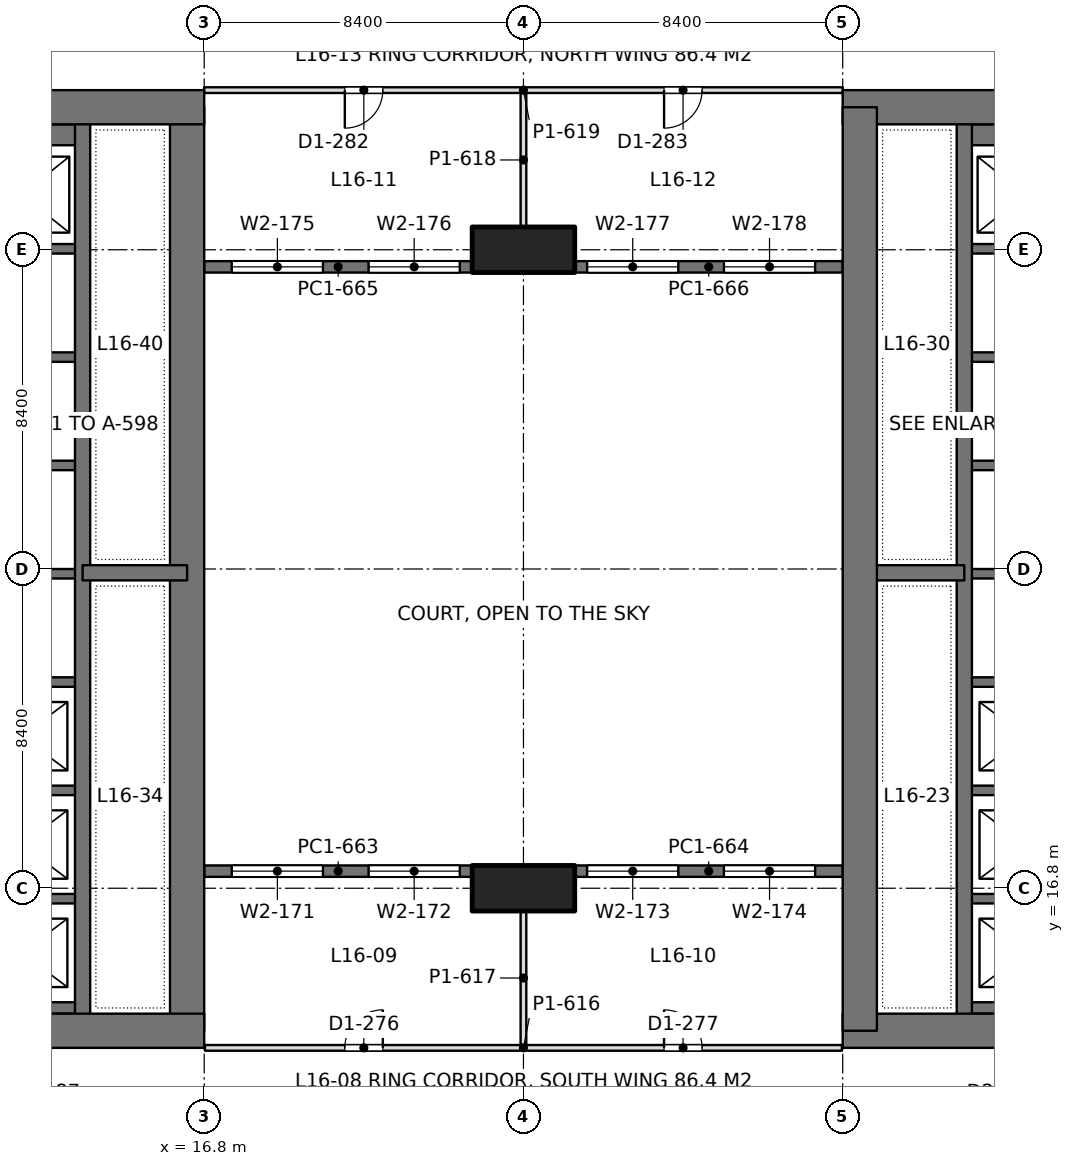
"""IFC4 building model, lengths in metres.
Left out: names, types, materials, properties, quantities, classifications, styles, units other than length and angle.
Written with IfcOpenShell. Run it as: python <this file> out.ifc"""

import sys

from ifc_helpers import new_model, si_unit, direction, frame, frame_2d, origin, origin_2d, place, context, subcontext, project, spatial, rectangle, extrude, element, fill, save


model = new_model("IFC4")
c1 = context("Model", 3, precision=1e-05, world=origin(), true_north=direction((0.0, 1.0)))
c2 = subcontext(c1, "Body", "Model", "MODEL_VIEW")
j1 = project(units=[si_unit("LENGTHUNIT", "METRE"), si_unit("PLANEANGLEUNIT", "RADIAN")], contexts=[c1])
p1 = place(None, origin())
s1 = spatial("IfcSite", under=j1, at=p1, CompositionType="ELEMENT")
p2 = place(p1, origin())
s2 = spatial("IfcBuilding", under=s1, at=p2, CompositionType="ELEMENT")
p3 = place(p2, frame((0.0, 0.0, 72.9)))
s3 = spatial("IfcBuildingStorey", under=s2, at=p3, CompositionType="ELEMENT", Elevation=72.9)
for number, where, z_axis, x_axis in (
    (1, (25.2, 16.8, 0.0), (0.0, 0.0, 1.0), (1.0, 0.0, 0.0)),
    (2, (25.2, 33.6, 0.0), (0.0, 0.0, 1.0), (1.0, 0.0, 0.0)),
):
    element("IfcColumn", number, at=place(p3, frame(where, z_axis=z_axis, x_axis=x_axis)), inside=s3, PredefinedType="COLUMN", context=c2, shape_type="SweptSolid", body=[
        extrude(rectangle(XDim=2.7, YDim=1.2, at=origin_2d()), origin(), (0.0, 0.0, 1.0), 4.5),
    ])
p4 = place(p3, frame((-1.2, 13.05, 0.0), z_axis=(0.0, 0.0, 1.0), x_axis=(1.0, 0.0, 0.0)))
e3 = element("IfcWall", 3, at=p4, inside=s3, PredefinedType="SHEAR", context=c2, shape_type="SweptSolid", body=[
    extrude(rectangle(XDim=18.0, YDim=0.9, at=frame_2d((9.0, 0.0))), origin(), (0.0, 0.0, 1.0), 4.5),
])
p5 = place(p4, frame((8.95, 0.0, 0.0)))
e4 = element("IfcOpeningElement", 4, at=p5, cuts=e3, PredefinedType="OPENING", context=c2, shape_type="SweptSolid", body=[
    extrude(rectangle(XDim=1.8, YDim=2.4, at=frame_2d((0.9, 1.2))), frame((0.0, 0.46, 0.0), z_axis=(0.0, -1.0, 0.0), x_axis=(1.0, 0.0, 0.0)), (0.0, 0.0, 1.0), 0.92),
])
p6 = place(p3, frame((-1.2, 37.35, 0.0), z_axis=(0.0, 0.0, 1.0), x_axis=(1.0, 0.0, 0.0)))
e5 = element("IfcWall", 5, at=p6, inside=s3, PredefinedType="SHEAR", context=c2, shape_type="SweptSolid", body=[
    extrude(rectangle(XDim=18.0, YDim=0.9, at=frame_2d((9.0, 0.0))), origin(), (0.0, 0.0, 1.0), 4.5),
])
p7 = place(p6, frame((8.95, 0.0, 0.0)))
e6 = element("IfcOpeningElement", 6, at=p7, cuts=e5, PredefinedType="OPENING", context=c2, shape_type="SweptSolid", body=[
    extrude(rectangle(XDim=1.8, YDim=2.4, at=frame_2d((0.9, 1.2))), frame((0.0, 0.46, 0.0), z_axis=(0.0, -1.0, 0.0), x_axis=(1.0, 0.0, 0.0)), (0.0, 0.0, 1.0), 0.92),
])
p8 = place(p3, frame((16.35, 13.05, 0.0), z_axis=(0.0, 0.0, 1.0), x_axis=(0.0, 1.0, 0.0)))
e7 = element("IfcWall", 7, at=p8, inside=s3, PredefinedType="SHEAR", context=c2, shape_type="SweptSolid", body=[
    extrude(rectangle(XDim=24.3, YDim=0.9, at=frame_2d((12.15, 0.0))), origin(), (0.0, 0.0, 1.0), 4.5),
])
p9 = place(p3, frame((13.6, 13.05, 0.0), z_axis=(0.0, 0.0, 1.0), x_axis=(0.0, 1.0, 0.0)))
e8 = element("IfcWall", 8, at=p9, inside=s3, PredefinedType="SHEAR", context=c2, shape_type="SweptSolid", body=[
    extrude(rectangle(XDim=24.3, YDim=0.4, at=frame_2d((12.15, 0.0))), origin(), (0.0, 0.0, 1.0), 4.5),
])
p10 = place(p3, frame((13.6, 25.1, 0.0), z_axis=(0.0, 0.0, 1.0), x_axis=(1.0, 0.0, 0.0)))
e9 = element("IfcWall", 9, at=p10, inside=s3, PredefinedType="SHEAR", context=c2, shape_type="SweptSolid", body=[
    extrude(rectangle(XDim=2.75, YDim=0.4, at=frame_2d((1.375, 0.0))), origin(), (0.0, 0.0, 1.0), 4.5),
])
p11 = place(p3, frame((10.4, 13.65, 0.0), z_axis=(0.0, 0.0, 1.0), x_axis=(1.0, 0.0, 0.0)))
e10 = element("IfcWall", 10, at=p11, inside=s3, PredefinedType="SHEAR", context=c2, shape_type="SweptSolid", body=[
    extrude(rectangle(XDim=3.2, YDim=0.3, at=frame_2d((1.6, 0.0))), origin(), (0.0, 0.0, 1.0), 4.5),
])
for number, where, z_axis, x_axis in (
    (11, (10.4, 16.525, 0.0), (0.0, 0.0, 1.0), (1.0, 0.0, 0.0)),
    (12, (10.4, 19.375, 0.0), (0.0, 0.0, 1.0), (1.0, 0.0, 0.0)),
    (13, (10.4, 22.225, 0.0), (0.0, 0.0, 1.0), (1.0, 0.0, 0.0)),
    (14, (10.4, 25.075, 0.0), (0.0, 0.0, 1.0), (1.0, 0.0, 0.0)),
    (15, (10.4, 27.925, 0.0), (0.0, 0.0, 1.0), (1.0, 0.0, 0.0)),
    (16, (10.4, 30.775, 0.0), (0.0, 0.0, 1.0), (1.0, 0.0, 0.0)),
    (17, (10.4, 33.625, 0.0), (0.0, 0.0, 1.0), (1.0, 0.0, 0.0)),
):
    element("IfcWall", number, at=place(p3, frame(where, z_axis=z_axis, x_axis=x_axis)), inside=s3, PredefinedType="SHEAR", context=c2, shape_type="SweptSolid", body=[
        extrude(rectangle(XDim=3.2, YDim=0.25, at=frame_2d((1.6, 0.0))), origin(), (0.0, 0.0, 1.0), 4.5),
    ])
p12 = place(p3, frame((10.4, 36.625, 0.0), z_axis=(0.0, 0.0, 1.0), x_axis=(1.0, 0.0, 0.0)))
e18 = element("IfcWall", 18, at=p12, inside=s3, PredefinedType="SHEAR", context=c2, shape_type="SweptSolid", body=[
    extrude(rectangle(XDim=3.2, YDim=0.55, at=frame_2d((1.6, 0.0))), origin(), (0.0, 0.0, 1.0), 4.5),
])
p13 = place(p3, frame((33.6, 13.05, 0.0), z_axis=(0.0, 0.0, 1.0), x_axis=(1.0, 0.0, 0.0)))
e19 = element("IfcWall", 19, at=p13, inside=s3, PredefinedType="SHEAR", context=c2, shape_type="SweptSolid", body=[
    extrude(rectangle(XDim=18.0, YDim=0.9, at=frame_2d((9.0, 0.0))), origin(), (0.0, 0.0, 1.0), 4.5),
])
p14 = place(p13, frame((7.25, 0.0, 0.0)))
e20 = element("IfcOpeningElement", 20, at=p14, cuts=e19, PredefinedType="OPENING", context=c2, shape_type="SweptSolid", body=[
    extrude(rectangle(XDim=1.8, YDim=2.4, at=frame_2d((0.9, 1.2))), frame((0.0, 0.46, 0.0), z_axis=(0.0, -1.0, 0.0), x_axis=(1.0, 0.0, 0.0)), (0.0, 0.0, 1.0), 0.92),
])
p15 = place(p3, frame((33.6, 37.35, 0.0), z_axis=(0.0, 0.0, 1.0), x_axis=(1.0, 0.0, 0.0)))
e21 = element("IfcWall", 21, at=p15, inside=s3, PredefinedType="SHEAR", context=c2, shape_type="SweptSolid", body=[
    extrude(rectangle(XDim=18.0, YDim=0.9, at=frame_2d((9.0, 0.0))), origin(), (0.0, 0.0, 1.0), 4.5),
])
p16 = place(p15, frame((7.25, 0.0, 0.0)))
e22 = element("IfcOpeningElement", 22, at=p16, cuts=e21, PredefinedType="OPENING", context=c2, shape_type="SweptSolid", body=[
    extrude(rectangle(XDim=1.8, YDim=2.4, at=frame_2d((0.9, 1.2))), frame((0.0, 0.46, 0.0), z_axis=(0.0, -1.0, 0.0), x_axis=(1.0, 0.0, 0.0)), (0.0, 0.0, 1.0), 0.92),
])
p17 = place(p3, frame((34.05, 13.05, 0.0), z_axis=(0.0, 0.0, 1.0), x_axis=(0.0, 1.0, 0.0)))
e23 = element("IfcWall", 23, at=p17, inside=s3, PredefinedType="SHEAR", context=c2, shape_type="SweptSolid", body=[
    extrude(rectangle(XDim=24.3, YDim=0.9, at=frame_2d((12.15, 0.0))), origin(), (0.0, 0.0, 1.0), 4.5),
])
p18 = place(p3, frame((36.8, 13.05, 0.0), z_axis=(0.0, 0.0, 1.0), x_axis=(0.0, 1.0, 0.0)))
e24 = element("IfcWall", 24, at=p18, inside=s3, PredefinedType="SHEAR", context=c2, shape_type="SweptSolid", body=[
    extrude(rectangle(XDim=24.3, YDim=0.4, at=frame_2d((12.15, 0.0))), origin(), (0.0, 0.0, 1.0), 4.5),
])
p19 = place(p3, frame((36.8, 25.1, 0.0), z_axis=(0.0, 0.0, 1.0), x_axis=(-1.0, 0.0, 0.0)))
e25 = element("IfcWall", 25, at=p19, inside=s3, PredefinedType="SHEAR", context=c2, shape_type="SweptSolid", body=[
    extrude(rectangle(XDim=2.75, YDim=0.4, at=frame_2d((1.375, 0.0))), origin(), (0.0, 0.0, 1.0), 4.5),
])
p20 = place(p3, frame((40.0, 13.65, 0.0), z_axis=(0.0, 0.0, 1.0), x_axis=(-1.0, 0.0, 0.0)))
e26 = element("IfcWall", 26, at=p20, inside=s3, PredefinedType="SHEAR", context=c2, shape_type="SweptSolid", body=[
    extrude(rectangle(XDim=3.2, YDim=0.3, at=frame_2d((1.6, 0.0))), origin(), (0.0, 0.0, 1.0), 4.5),
])
for number, where, z_axis, x_axis in (
    (27, (40.0, 16.525, 0.0), (0.0, 0.0, 1.0), (-1.0, 0.0, 0.0)),
    (28, (40.0, 19.375, 0.0), (0.0, 0.0, 1.0), (-1.0, 0.0, 0.0)),
    (29, (40.0, 22.225, 0.0), (0.0, 0.0, 1.0), (-1.0, 0.0, 0.0)),
    (30, (40.0, 25.075, 0.0), (0.0, 0.0, 1.0), (-1.0, 0.0, 0.0)),
    (31, (40.0, 27.925, 0.0), (0.0, 0.0, 1.0), (-1.0, 0.0, 0.0)),
    (32, (40.0, 30.775, 0.0), (0.0, 0.0, 1.0), (-1.0, 0.0, 0.0)),
    (33, (40.0, 33.625, 0.0), (0.0, 0.0, 1.0), (-1.0, 0.0, 0.0)),
):
    element("IfcWall", number, at=place(p3, frame(where, z_axis=z_axis, x_axis=x_axis)), inside=s3, PredefinedType="SHEAR", context=c2, shape_type="SweptSolid", body=[
        extrude(rectangle(XDim=3.2, YDim=0.25, at=frame_2d((1.6, 0.0))), origin(), (0.0, 0.0, 1.0), 4.5),
    ])
p21 = place(p3, frame((40.0, 36.625, 0.0), z_axis=(0.0, 0.0, 1.0), x_axis=(-1.0, 0.0, 0.0)))
e34 = element("IfcWall", 34, at=p21, inside=s3, PredefinedType="SHEAR", context=c2, shape_type="SweptSolid", body=[
    extrude(rectangle(XDim=3.2, YDim=0.55, at=frame_2d((1.6, 0.0))), origin(), (0.0, 0.0, 1.0), 4.5),
])
p22 = place(p3, frame((16.8, 17.25, 0.0), z_axis=(0.0, 0.0, 1.0), x_axis=(1.0, 0.0, 0.0)))
e35 = element("IfcWall", 35, at=p22, inside=s3, PredefinedType="SOLIDWALL", context=c2, shape_type="SweptSolid", body=[
    extrude(rectangle(XDim=7.05, YDim=0.3, at=frame_2d((3.525, 0.0))), origin(), (0.0, 0.0, 1.0), 4.34),
])
p23 = place(p22, frame((0.725, 0.0, 0.9)))
e36 = element("IfcOpeningElement", 36, at=p23, cuts=e35, PredefinedType="OPENING", context=c2, shape_type="SweptSolid", body=[
    extrude(rectangle(XDim=2.4, YDim=1.9, at=frame_2d((1.2, 0.95))), frame((0.0, 0.16, 0.0), z_axis=(0.0, -1.0, 0.0), x_axis=(1.0, 0.0, 0.0)), (0.0, 0.0, 1.0), 0.32),
])
p24 = place(p22, frame((4.325, 0.0, 0.9)))
e37 = element("IfcOpeningElement", 37, at=p24, cuts=e35, PredefinedType="OPENING", context=c2, shape_type="SweptSolid", body=[
    extrude(rectangle(XDim=2.4, YDim=1.9, at=frame_2d((1.2, 0.95))), frame((0.0, 0.16, 0.0), z_axis=(0.0, -1.0, 0.0), x_axis=(1.0, 0.0, 0.0)), (0.0, 0.0, 1.0), 0.32),
])
p25 = place(p3, frame((26.55, 17.25, 0.0), z_axis=(0.0, 0.0, 1.0), x_axis=(1.0, 0.0, 0.0)))
e38 = element("IfcWall", 38, at=p25, inside=s3, PredefinedType="SOLIDWALL", context=c2, shape_type="SweptSolid", body=[
    extrude(rectangle(XDim=7.05, YDim=0.3, at=frame_2d((3.525, 0.0))), origin(), (0.0, 0.0, 1.0), 4.34),
])
p26 = place(p25, frame((0.325, 0.0, 0.9)))
e39 = element("IfcOpeningElement", 39, at=p26, cuts=e38, PredefinedType="OPENING", context=c2, shape_type="SweptSolid", body=[
    extrude(rectangle(XDim=2.4, YDim=1.9, at=frame_2d((1.2, 0.95))), frame((0.0, 0.16, 0.0), z_axis=(0.0, -1.0, 0.0), x_axis=(1.0, 0.0, 0.0)), (0.0, 0.0, 1.0), 0.32),
])
p27 = place(p25, frame((3.925, 0.0, 0.9)))
e40 = element("IfcOpeningElement", 40, at=p27, cuts=e38, PredefinedType="OPENING", context=c2, shape_type="SweptSolid", body=[
    extrude(rectangle(XDim=2.4, YDim=1.9, at=frame_2d((1.2, 0.95))), frame((0.0, 0.16, 0.0), z_axis=(0.0, -1.0, 0.0), x_axis=(1.0, 0.0, 0.0)), (0.0, 0.0, 1.0), 0.32),
])
p28 = place(p3, frame((16.8, 33.15, 0.0), z_axis=(0.0, 0.0, 1.0), x_axis=(1.0, 0.0, 0.0)))
e41 = element("IfcWall", 41, at=p28, inside=s3, PredefinedType="SOLIDWALL", context=c2, shape_type="SweptSolid", body=[
    extrude(rectangle(XDim=7.05, YDim=0.3, at=frame_2d((3.525, 0.0))), origin(), (0.0, 0.0, 1.0), 4.34),
])
p29 = place(p28, frame((0.725, 0.0, 0.9)))
e42 = element("IfcOpeningElement", 42, at=p29, cuts=e41, PredefinedType="OPENING", context=c2, shape_type="SweptSolid", body=[
    extrude(rectangle(XDim=2.4, YDim=1.9, at=frame_2d((1.2, 0.95))), frame((0.0, 0.16, 0.0), z_axis=(0.0, -1.0, 0.0), x_axis=(1.0, 0.0, 0.0)), (0.0, 0.0, 1.0), 0.32),
])
p30 = place(p28, frame((4.325, 0.0, 0.9)))
e43 = element("IfcOpeningElement", 43, at=p30, cuts=e41, PredefinedType="OPENING", context=c2, shape_type="SweptSolid", body=[
    extrude(rectangle(XDim=2.4, YDim=1.9, at=frame_2d((1.2, 0.95))), frame((0.0, 0.16, 0.0), z_axis=(0.0, -1.0, 0.0), x_axis=(1.0, 0.0, 0.0)), (0.0, 0.0, 1.0), 0.32),
])
p31 = place(p3, frame((26.55, 33.15, 0.0), z_axis=(0.0, 0.0, 1.0), x_axis=(1.0, 0.0, 0.0)))
e44 = element("IfcWall", 44, at=p31, inside=s3, PredefinedType="SOLIDWALL", context=c2, shape_type="SweptSolid", body=[
    extrude(rectangle(XDim=7.05, YDim=0.3, at=frame_2d((3.525, 0.0))), origin(), (0.0, 0.0, 1.0), 4.34),
])
p32 = place(p31, frame((0.325, 0.0, 0.9)))
e45 = element("IfcOpeningElement", 45, at=p32, cuts=e44, PredefinedType="OPENING", context=c2, shape_type="SweptSolid", body=[
    extrude(rectangle(XDim=2.4, YDim=1.9, at=frame_2d((1.2, 0.95))), frame((0.0, 0.16, 0.0), z_axis=(0.0, -1.0, 0.0), x_axis=(1.0, 0.0, 0.0)), (0.0, 0.0, 1.0), 0.32),
])
p33 = place(p31, frame((3.925, 0.0, 0.9)))
e46 = element("IfcOpeningElement", 46, at=p33, cuts=e44, PredefinedType="OPENING", context=c2, shape_type="SweptSolid", body=[
    extrude(rectangle(XDim=2.4, YDim=1.9, at=frame_2d((1.2, 0.95))), frame((0.0, 0.16, 0.0), z_axis=(0.0, -1.0, 0.0), x_axis=(1.0, 0.0, 0.0)), (0.0, 0.0, 1.0), 0.32),
])
p34 = place(p3, frame((16.82, 12.6, 0.0), z_axis=(0.0, 0.0, 1.0), x_axis=(1.0, 0.0, 0.0)))
e47 = element("IfcWall", 47, at=p34, inside=s3, PredefinedType="PARTITIONING", context=c2, shape_type="SweptSolid", body=[
    extrude(rectangle(XDim=16.76, YDim=0.15, at=frame_2d((8.38, 0.0))), origin(), (0.0, 0.0, 1.0), 3.74),
])
p35 = place(p34, frame((3.68, 0.0, 0.0)))
e48 = element("IfcOpeningElement", 48, at=p35, cuts=e47, PredefinedType="OPENING", context=c2, shape_type="SweptSolid", body=[
    extrude(rectangle(XDim=1.0, YDim=2.2, at=frame_2d((0.5, 1.1))), frame((0.0, 0.085, 0.0), z_axis=(0.0, -1.0, 0.0), x_axis=(1.0, 0.0, 0.0)), (0.0, 0.0, 1.0), 0.17),
])
p36 = place(p34, frame((12.08, 0.0, 0.0)))
e49 = element("IfcOpeningElement", 49, at=p36, cuts=e47, PredefinedType="OPENING", context=c2, shape_type="SweptSolid", body=[
    extrude(rectangle(XDim=1.0, YDim=2.2, at=frame_2d((0.5, 1.1))), frame((0.0, 0.085, 0.0), z_axis=(0.0, -1.0, 0.0), x_axis=(1.0, 0.0, 0.0)), (0.0, 0.0, 1.0), 0.17),
])
p37 = place(p3, frame((25.2, 12.674, 0.0), z_axis=(0.0, 0.0, 1.0), x_axis=(0.0, 1.0, 0.0)))
e50 = element("IfcWall", 50, at=p37, inside=s3, PredefinedType="PARTITIONING", context=c2, shape_type="SweptSolid", body=[
    extrude(rectangle(XDim=3.527, YDim=0.15, at=frame_2d((1.763, 0.0))), origin(), (0.0, 0.0, 1.0), 3.74),
])
p38 = place(p3, frame((16.798, 37.8, 0.0), z_axis=(0.0, 0.0, 1.0), x_axis=(1.0, 0.0, 0.0)))
e51 = element("IfcWall", 51, at=p38, inside=s3, PredefinedType="PARTITIONING", context=c2, shape_type="SweptSolid", body=[
    extrude(rectangle(XDim=16.804, YDim=0.15, at=frame_2d((8.402, 0.0))), origin(), (0.0, 0.0, 1.0), 3.74),
])
p39 = place(p38, frame((3.702, 0.0, 0.0)))
e52 = element("IfcOpeningElement", 52, at=p39, cuts=e51, PredefinedType="OPENING", context=c2, shape_type="SweptSolid", body=[
    extrude(rectangle(XDim=1.0, YDim=2.2, at=frame_2d((0.5, 1.1))), frame((0.0, 0.085, 0.0), z_axis=(0.0, -1.0, 0.0), x_axis=(1.0, 0.0, 0.0)), (0.0, 0.0, 1.0), 0.17),
])
p40 = place(p38, frame((12.102, 0.0, 0.0)))
e53 = element("IfcOpeningElement", 53, at=p40, cuts=e51, PredefinedType="OPENING", context=c2, shape_type="SweptSolid", body=[
    extrude(rectangle(XDim=1.0, YDim=2.2, at=frame_2d((0.5, 1.1))), frame((0.0, 0.085, 0.0), z_axis=(0.0, -1.0, 0.0), x_axis=(1.0, 0.0, 0.0)), (0.0, 0.0, 1.0), 0.17),
])
p41 = place(p3, frame((25.2, 34.199, 0.0), z_axis=(0.0, 0.0, 1.0), x_axis=(0.0, 1.0, 0.0)))
e54 = element("IfcWall", 54, at=p41, inside=s3, PredefinedType="PARTITIONING", context=c2, shape_type="SweptSolid", body=[
    extrude(rectangle(XDim=3.527, YDim=0.15, at=frame_2d((1.764, 0.0))), origin(), (0.0, 0.0, 1.0), 3.74),
])
p42 = place(p23, origin())
e55 = element("IfcWindow", 55, at=p42, inside=s3, PartitioningType="SINGLE_PANEL", PredefinedType="WINDOW", context=c2, shape_type="SweptSolid", body=[
    extrude(rectangle(XDim=2.4, YDim=1.9, at=frame_2d((1.2, 0.95))), frame((0.0, 0.03, 0.0), z_axis=(0.0, -1.0, 0.0), x_axis=(1.0, 0.0, 0.0)), (0.0, 0.0, 1.0), 0.06),
])
fill(e36, e55)
p43 = place(p24, origin())
e56 = element("IfcWindow", 56, at=p43, inside=s3, PartitioningType="SINGLE_PANEL", PredefinedType="WINDOW", context=c2, shape_type="SweptSolid", body=[
    extrude(rectangle(XDim=2.4, YDim=1.9, at=frame_2d((1.2, 0.95))), frame((0.0, 0.03, 0.0), z_axis=(0.0, -1.0, 0.0), x_axis=(1.0, 0.0, 0.0)), (0.0, 0.0, 1.0), 0.06),
])
fill(e37, e56)
p44 = place(p26, origin())
e57 = element("IfcWindow", 57, at=p44, inside=s3, PartitioningType="SINGLE_PANEL", PredefinedType="WINDOW", context=c2, shape_type="SweptSolid", body=[
    extrude(rectangle(XDim=2.4, YDim=1.9, at=frame_2d((1.2, 0.95))), frame((0.0, 0.03, 0.0), z_axis=(0.0, -1.0, 0.0), x_axis=(1.0, 0.0, 0.0)), (0.0, 0.0, 1.0), 0.06),
])
fill(e39, e57)
p45 = place(p27, origin())
e58 = element("IfcWindow", 58, at=p45, inside=s3, PartitioningType="SINGLE_PANEL", PredefinedType="WINDOW", context=c2, shape_type="SweptSolid", body=[
    extrude(rectangle(XDim=2.4, YDim=1.9, at=frame_2d((1.2, 0.95))), frame((0.0, 0.03, 0.0), z_axis=(0.0, -1.0, 0.0), x_axis=(1.0, 0.0, 0.0)), (0.0, 0.0, 1.0), 0.06),
])
fill(e40, e58)
p46 = place(p29, origin())
e59 = element("IfcWindow", 59, at=p46, inside=s3, PartitioningType="SINGLE_PANEL", PredefinedType="WINDOW", context=c2, shape_type="SweptSolid", body=[
    extrude(rectangle(XDim=2.4, YDim=1.9, at=frame_2d((1.2, 0.95))), frame((0.0, 0.03, 0.0), z_axis=(0.0, -1.0, 0.0), x_axis=(1.0, 0.0, 0.0)), (0.0, 0.0, 1.0), 0.06),
])
fill(e42, e59)
p47 = place(p30, origin())
e60 = element("IfcWindow", 60, at=p47, inside=s3, PartitioningType="SINGLE_PANEL", PredefinedType="WINDOW", context=c2, shape_type="SweptSolid", body=[
    extrude(rectangle(XDim=2.4, YDim=1.9, at=frame_2d((1.2, 0.95))), frame((0.0, 0.03, 0.0), z_axis=(0.0, -1.0, 0.0), x_axis=(1.0, 0.0, 0.0)), (0.0, 0.0, 1.0), 0.06),
])
fill(e43, e60)
p48 = place(p32, origin())
e61 = element("IfcWindow", 61, at=p48, inside=s3, PartitioningType="SINGLE_PANEL", PredefinedType="WINDOW", context=c2, shape_type="SweptSolid", body=[
    extrude(rectangle(XDim=2.4, YDim=1.9, at=frame_2d((1.2, 0.95))), frame((0.0, 0.03, 0.0), z_axis=(0.0, -1.0, 0.0), x_axis=(1.0, 0.0, 0.0)), (0.0, 0.0, 1.0), 0.06),
])
fill(e45, e61)
p49 = place(p33, origin())
e62 = element("IfcWindow", 62, at=p49, inside=s3, PartitioningType="SINGLE_PANEL", PredefinedType="WINDOW", context=c2, shape_type="SweptSolid", body=[
    extrude(rectangle(XDim=2.4, YDim=1.9, at=frame_2d((1.2, 0.95))), frame((0.0, 0.03, 0.0), z_axis=(0.0, -1.0, 0.0), x_axis=(1.0, 0.0, 0.0)), (0.0, 0.0, 1.0), 0.06),
])
fill(e46, e62)
p50 = place(p35, origin())
e63 = element("IfcDoor", 63, at=p50, inside=s3, OperationType="SINGLE_SWING_RIGHT", PredefinedType="DOOR", context=c2, shape_type="SweptSolid", body=[
    extrude(rectangle(XDim=1.0, YDim=2.2, at=frame_2d((0.5, 1.1))), frame((0.0, 0.025, 0.0), z_axis=(0.0, -1.0, 0.0), x_axis=(1.0, 0.0, 0.0)), (0.0, 0.0, 1.0), 0.05),
])
fill(e48, e63)
p51 = place(p36, origin())
e64 = element("IfcDoor", 64, at=p51, inside=s3, OperationType="SINGLE_SWING_LEFT", PredefinedType="DOOR", context=c2, shape_type="SweptSolid", body=[
    extrude(rectangle(XDim=1.0, YDim=2.2, at=frame_2d((0.5, 1.1))), frame((0.0, 0.025, 0.0), z_axis=(0.0, -1.0, 0.0), x_axis=(1.0, 0.0, 0.0)), (0.0, 0.0, 1.0), 0.05),
])
fill(e49, e64)
p52 = place(p39, frame((1.0, 0.0, 0.0), z_axis=(0.0, 0.0, 1.0), x_axis=(-1.0, 0.0, 0.0)))
e65 = element("IfcDoor", 65, at=p52, inside=s3, OperationType="SINGLE_SWING_RIGHT", PredefinedType="DOOR", context=c2, shape_type="SweptSolid", body=[
    extrude(rectangle(XDim=1.0, YDim=2.2, at=frame_2d((0.5, 1.1))), frame((0.0, 0.025, 0.0), z_axis=(0.0, -1.0, 0.0), x_axis=(1.0, 0.0, 0.0)), (0.0, 0.0, 1.0), 0.05),
])
fill(e52, e65)
p53 = place(p40, frame((1.0, 0.0, 0.0), z_axis=(0.0, 0.0, 1.0), x_axis=(-1.0, 0.0, 0.0)))
e66 = element("IfcDoor", 66, at=p53, inside=s3, OperationType="SINGLE_SWING_RIGHT", PredefinedType="DOOR", context=c2, shape_type="SweptSolid", body=[
    extrude(rectangle(XDim=1.0, YDim=2.2, at=frame_2d((0.5, 1.1))), frame((0.0, 0.025, 0.0), z_axis=(0.0, -1.0, 0.0), x_axis=(1.0, 0.0, 0.0)), (0.0, 0.0, 1.0), 0.05),
])
fill(e53, e66)
save(model, sys.argv[1])
